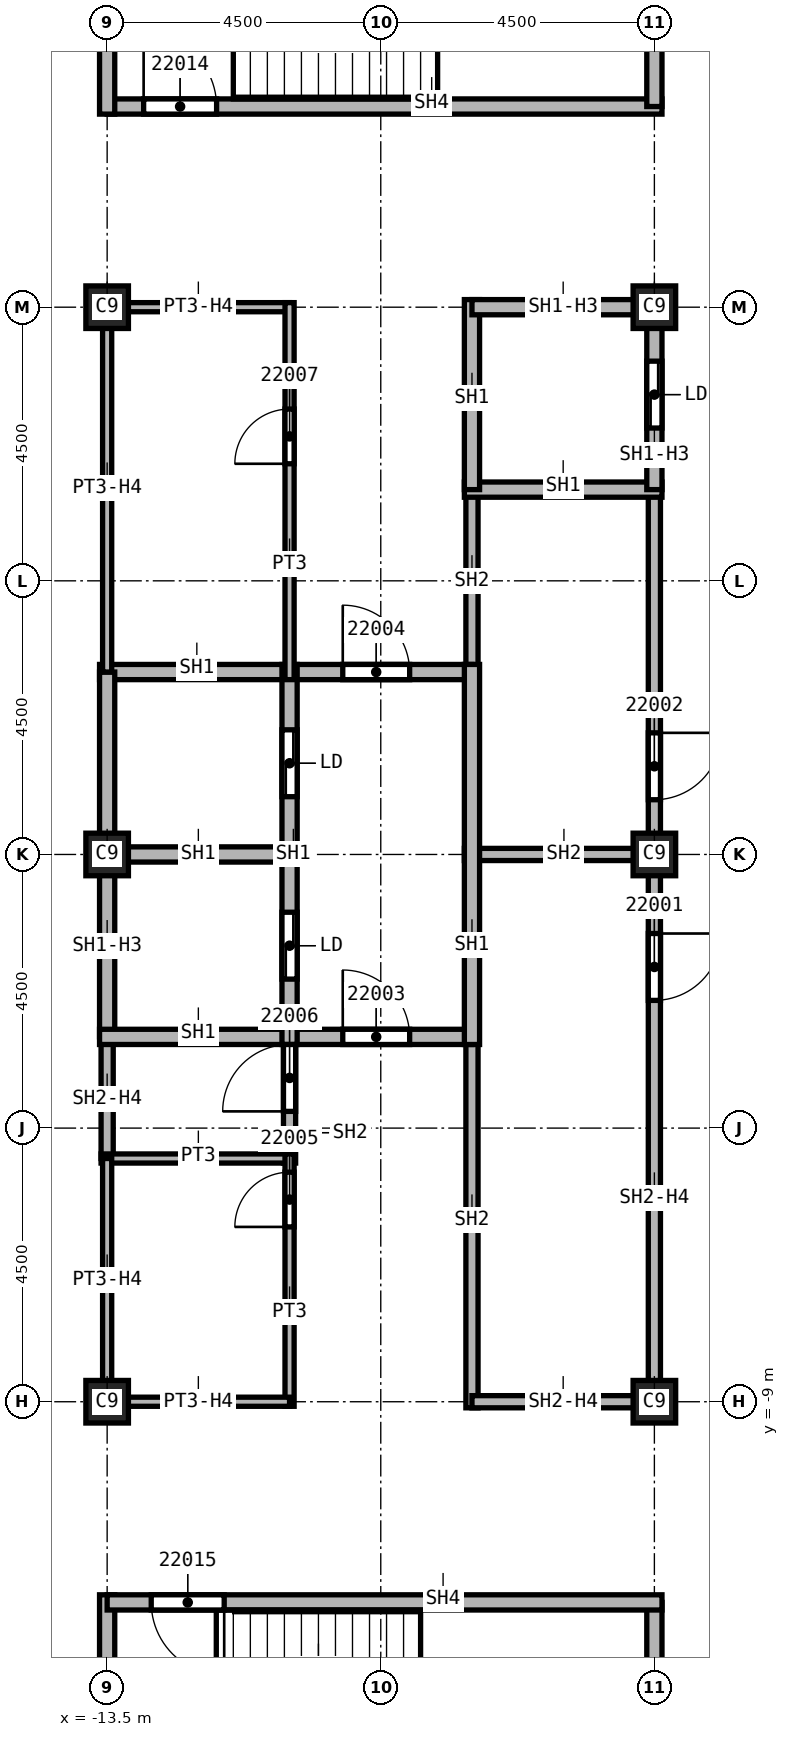
"""IFC4 building model, lengths in metres.
Left out: names, types, materials, properties, quantities, classifications, styles, units other than length and angle.
Written with IfcOpenShell. Run it as: python <this file> out.ifc"""

import sys

from ifc_helpers import new_model, si_unit, direction, frame, frame_2d, origin, origin_2d, place, context, subcontext, project, spatial, rectangle, extrude, element, fill, save


model = new_model("IFC4")
c1 = context("Model", 3, precision=1e-05, world=origin(), true_north=direction((0.0, 1.0)))
c2 = subcontext(c1, "Body", "Model", "MODEL_VIEW")
j1 = project(units=[si_unit("LENGTHUNIT", "METRE"), si_unit("PLANEANGLEUNIT", "RADIAN")], contexts=[c1])
p1 = place(None, origin())
s1 = spatial("IfcSite", under=j1, at=p1, CompositionType="ELEMENT")
p2 = place(p1, origin())
s2 = spatial("IfcBuilding", under=s1, at=p2, CompositionType="ELEMENT")
p3 = place(p2, frame((0.0, 0.0, 312.0)))
s3 = spatial("IfcBuildingStorey", under=s2, at=p3, CompositionType="ELEMENT", Elevation=312.0)
for number, where, z_axis, x_axis in (
    (1, (-4.5, 0.0, 0.0), (0.0, 0.0, 1.0), (1.0, 0.0, 0.0)),
    (2, (-4.5, 9.0, 0.0), (0.0, 0.0, 1.0), (1.0, 0.0, 0.0)),
    (3, (-4.5, -9.0, 0.0), (0.0, 0.0, 1.0), (1.0, 0.0, 0.0)),
    (4, (-13.5, 0.0, 0.0), (0.0, 0.0, 1.0), (1.0, 0.0, 0.0)),
    (5, (-13.5, 9.0, 0.0), (0.0, 0.0, 1.0), (1.0, 0.0, 0.0)),
    (6, (-13.5, -9.0, 0.0), (0.0, 0.0, 1.0), (1.0, 0.0, 0.0)),
):
    element("IfcColumn", number, at=place(p3, frame(where, z_axis=z_axis, x_axis=x_axis)), inside=s3, PredefinedType="COLUMN", context=c2, shape_type="SweptSolid", body=[
        extrude(rectangle(XDim=0.7, YDim=0.7, at=origin_2d()), origin(), (0.0, 0.0, 1.0), 3.74),
    ])
p4 = place(p3, frame((-13.5, -5.0, 0.0), z_axis=(0.0, 0.0, 1.0), x_axis=(0.0, 1.0, 0.0)))
e7 = element("IfcWall", 7, at=p4, inside=s3, PredefinedType="SOLIDWALL", context=c2, shape_type="SweptSolid", body=[
    extrude(rectangle(XDim=2.0, YDim=0.2, at=frame_2d((1.0, 0.0))), origin(), (0.0, 0.0, 1.0), 3.062),
])
p5 = place(p3, frame((-10.5, -5.075, 0.0), z_axis=(0.0, 0.0, 1.0), x_axis=(0.0, 1.0, 0.0)))
e8 = element("IfcWall", 8, at=p5, inside=s3, PredefinedType="SOLIDWALL", context=c2, shape_type="SweptSolid", body=[
    extrude(rectangle(XDim=2.2, YDim=0.2, at=frame_2d((1.1, 0.0))), origin(), (0.0, 0.0, 1.0), 3.74),
])
p6 = place(p5, frame((0.85, 0.0, 0.0)))
e9 = element("IfcOpeningElement", 9, at=p6, cuts=e8, PredefinedType="OPENING", context=c2, shape_type="SweptSolid", body=[
    extrude(rectangle(XDim=1.1, YDim=2.1, at=frame_2d((0.55, 1.05))), frame((0.0, 0.1, 0.0), z_axis=(0.0, -1.0, 0.0), x_axis=(1.0, 0.0, 0.0)), (0.0, 0.0, 1.0), 0.2),
])
p7 = place(p3, frame((-7.625, 0.0, 0.0), z_axis=(0.0, 0.0, 1.0), x_axis=(1.0, 0.0, 0.0)))
e10 = element("IfcWall", 10, at=p7, inside=s3, PredefinedType="SOLIDWALL", context=c2, shape_type="SweptSolid", body=[
    extrude(rectangle(XDim=3.225, YDim=0.2, at=frame_2d((1.613, 0.0))), origin(), (0.0, 0.0, 1.0), 3.74),
])
p8 = place(p3, frame((-7.5, -9.1, 0.0), z_axis=(0.0, 0.0, 1.0), x_axis=(0.0, 1.0, 0.0)))
e11 = element("IfcWall", 11, at=p8, inside=s3, PredefinedType="SOLIDWALL", context=c2, shape_type="SweptSolid", body=[
    extrude(rectangle(XDim=6.225, YDim=0.2, at=frame_2d((3.113, 0.0))), origin(), (0.0, 0.0, 1.0), 3.74),
])
p9 = place(p3, frame((-7.5, 2.875, 0.0), z_axis=(0.0, 0.0, 1.0), x_axis=(0.0, 1.0, 0.0)))
e12 = element("IfcWall", 12, at=p9, inside=s3, PredefinedType="SOLIDWALL", context=c2, shape_type="SweptSolid", body=[
    extrude(rectangle(XDim=3.125, YDim=0.2, at=frame_2d((1.562, 0.0))), origin(), (0.0, 0.0, 1.0), 3.74),
])
p10 = place(p3, frame((-4.5, -9.0, 0.0), z_axis=(0.0, 0.0, 1.0), x_axis=(-1.0, 0.0, 0.0)))
e13 = element("IfcWall", 13, at=p10, inside=s3, PredefinedType="SOLIDWALL", context=c2, shape_type="SweptSolid", body=[
    extrude(rectangle(XDim=3.0, YDim=0.2, at=frame_2d((1.5, 0.0))), origin(), (0.0, 0.0, 1.0), 3.062),
])
p11 = place(p3, frame((-4.5, 6.0, 0.0), z_axis=(0.0, 0.0, 1.0), x_axis=(0.0, -1.0, 0.0)))
e14 = element("IfcWall", 14, at=p11, inside=s3, PredefinedType="SOLIDWALL", context=c2, shape_type="SweptSolid", body=[
    extrude(rectangle(XDim=15.1, YDim=0.2, at=frame_2d((7.55, 0.0))), origin(), (0.0, 0.0, 1.0), 3.062),
])
p12 = place(p11, frame((7.3, 0.0, 0.0)))
e15 = element("IfcOpeningElement", 15, at=p12, cuts=e14, PredefinedType="OPENING", context=c2, shape_type="SweptSolid", body=[
    extrude(rectangle(XDim=1.1, YDim=2.1, at=frame_2d((0.55, 1.05))), frame((0.0, 0.1, 0.0), z_axis=(0.0, -1.0, 0.0), x_axis=(1.0, 0.0, 0.0)), (0.0, 0.0, 1.0), 0.2),
])
p13 = place(p11, frame((4.0, 0.0, 0.0)))
e16 = element("IfcOpeningElement", 16, at=p13, cuts=e14, PredefinedType="OPENING", context=c2, shape_type="SweptSolid", body=[
    extrude(rectangle(XDim=1.1, YDim=2.1, at=frame_2d((0.55, 1.05))), frame((0.0, 0.1, 0.0), z_axis=(0.0, -1.0, 0.0), x_axis=(1.0, 0.0, 0.0)), (0.0, 0.0, 1.0), 0.2),
])
p14 = place(p3, frame((-13.625, 0.0, 0.0), z_axis=(0.0, 0.0, 1.0), x_axis=(1.0, 0.0, 0.0)))
e17 = element("IfcWall", 17, at=p14, inside=s3, PredefinedType="SOLIDWALL", context=c2, shape_type="SweptSolid", body=[
    extrude(rectangle(XDim=3.125, YDim=0.25, at=frame_2d((1.562, 0.0))), origin(), (0.0, 0.0, 1.0), 3.74),
])
p15 = place(p3, frame((-13.625, 3.0, 0.0), z_axis=(0.0, 0.0, 1.0), x_axis=(1.0, 0.0, 0.0)))
e18 = element("IfcWall", 18, at=p15, inside=s3, PredefinedType="SOLIDWALL", context=c2, shape_type="SweptSolid", body=[
    extrude(rectangle(XDim=6.125, YDim=0.25, at=frame_2d((3.062, 0.0))), origin(), (0.0, 0.0, 1.0), 3.74),
])
p16 = place(p15, frame((4.0, 0.0, 0.0)))
e19 = element("IfcOpeningElement", 19, at=p16, cuts=e18, PredefinedType="OPENING", context=c2, shape_type="SweptSolid", body=[
    extrude(rectangle(XDim=1.1, YDim=2.1, at=frame_2d((0.55, 1.05))), frame((0.0, 0.125, 0.0), z_axis=(0.0, -1.0, 0.0), x_axis=(1.0, 0.0, 0.0)), (0.0, 0.0, 1.0), 0.25),
])
p17 = place(p3, frame((-13.5, -3.0, 0.0), z_axis=(0.0, 0.0, 1.0), x_axis=(0.0, 1.0, 0.0)))
e20 = element("IfcWall", 20, at=p17, inside=s3, PredefinedType="SOLIDWALL", context=c2, shape_type="SweptSolid", body=[
    extrude(rectangle(XDim=6.0, YDim=0.25, at=frame_2d((3.0, 0.0))), origin(), (0.0, 0.0, 1.0), 3.062),
])
p18 = place(p3, frame((-13.625, -3.0, 0.0), z_axis=(0.0, 0.0, 1.0), x_axis=(1.0, 0.0, 0.0)))
e21 = element("IfcWall", 21, at=p18, inside=s3, PredefinedType="SOLIDWALL", context=c2, shape_type="SweptSolid", body=[
    extrude(rectangle(XDim=6.125, YDim=0.25, at=frame_2d((3.062, 0.0))), origin(), (0.0, 0.0, 1.0), 3.74),
])
p19 = place(p18, frame((4.0, 0.0, 0.0)))
e22 = element("IfcOpeningElement", 22, at=p19, cuts=e21, PredefinedType="OPENING", context=c2, shape_type="SweptSolid", body=[
    extrude(rectangle(XDim=1.1, YDim=2.1, at=frame_2d((0.55, 1.05))), frame((0.0, 0.125, 0.0), z_axis=(0.0, -1.0, 0.0), x_axis=(1.0, 0.0, 0.0)), (0.0, 0.0, 1.0), 0.25),
])
p20 = place(p3, frame((-10.5, -3.125, 0.0), z_axis=(0.0, 0.0, 1.0), x_axis=(0.0, 1.0, 0.0)))
e23 = element("IfcWall", 23, at=p20, inside=s3, PredefinedType="SOLIDWALL", context=c2, shape_type="SweptSolid", body=[
    extrude(rectangle(XDim=6.25, YDim=0.25, at=frame_2d((3.125, 0.0))), origin(), (0.0, 0.0, 1.0), 3.74),
])
p21 = place(p20, frame((1.075, 0.0, 0.0)))
e24 = element("IfcOpeningElement", 24, at=p21, cuts=e23, PredefinedType="OPENING", context=c2, shape_type="SweptSolid", body=[
    extrude(rectangle(XDim=1.1, YDim=2.1, at=frame_2d((0.55, 1.05))), frame((0.0, 0.125, 0.0), z_axis=(0.0, -1.0, 0.0), x_axis=(1.0, 0.0, 0.0)), (0.0, 0.0, 1.0), 0.25),
])
p22 = place(p20, frame((4.075, 0.0, 0.0)))
e25 = element("IfcOpeningElement", 25, at=p22, cuts=e23, PredefinedType="OPENING", context=c2, shape_type="SweptSolid", body=[
    extrude(rectangle(XDim=1.1, YDim=2.1, at=frame_2d((0.55, 1.05))), frame((0.0, 0.125, 0.0), z_axis=(0.0, -1.0, 0.0), x_axis=(1.0, 0.0, 0.0)), (0.0, 0.0, 1.0), 0.25),
])
p23 = place(p3, frame((-7.625, 6.0, 0.0), z_axis=(0.0, 0.0, 1.0), x_axis=(1.0, 0.0, 0.0)))
e26 = element("IfcWall", 26, at=p23, inside=s3, PredefinedType="SOLIDWALL", context=c2, shape_type="SweptSolid", body=[
    extrude(rectangle(XDim=3.25, YDim=0.25, at=frame_2d((1.625, 0.0))), origin(), (0.0, 0.0, 1.0), 3.74),
])
p24 = place(p3, frame((-7.5, -3.125, 0.0), z_axis=(0.0, 0.0, 1.0), x_axis=(0.0, 1.0, 0.0)))
e27 = element("IfcWall", 27, at=p24, inside=s3, PredefinedType="SOLIDWALL", context=c2, shape_type="SweptSolid", body=[
    extrude(rectangle(XDim=6.25, YDim=0.25, at=frame_2d((3.125, 0.0))), origin(), (0.0, 0.0, 1.0), 3.74),
])
p25 = place(p3, frame((-7.5, 6.0, 0.0), z_axis=(0.0, 0.0, 1.0), x_axis=(0.0, 1.0, 0.0)))
e28 = element("IfcWall", 28, at=p25, inside=s3, PredefinedType="SOLIDWALL", context=c2, shape_type="SweptSolid", body=[
    extrude(rectangle(XDim=3.125, YDim=0.25, at=frame_2d((1.562, 0.0))), origin(), (0.0, 0.0, 1.0), 3.74),
])
p26 = place(p3, frame((-7.5, 9.0, 0.0), z_axis=(0.0, 0.0, 1.0), x_axis=(1.0, 0.0, 0.0)))
e29 = element("IfcWall", 29, at=p26, inside=s3, PredefinedType="SOLIDWALL", context=c2, shape_type="SweptSolid", body=[
    extrude(rectangle(XDim=3.0, YDim=0.25, at=frame_2d((1.5, 0.0))), origin(), (0.0, 0.0, 1.0), 3.062),
])
p27 = place(p3, frame((-4.5, 9.125, 0.0), z_axis=(0.0, 0.0, 1.0), x_axis=(0.0, -1.0, 0.0)))
e30 = element("IfcWall", 30, at=p27, inside=s3, PredefinedType="SOLIDWALL", context=c2, shape_type="SweptSolid", body=[
    extrude(rectangle(XDim=3.125, YDim=0.25, at=frame_2d((1.562, 0.0))), origin(), (0.0, 0.0, 1.0), 3.062),
])
p28 = place(p27, frame((1.012, 0.0, 0.0)))
e31 = element("IfcOpeningElement", 31, at=p28, cuts=e30, PredefinedType="OPENING", context=c2, shape_type="SweptSolid", body=[
    extrude(rectangle(XDim=1.1, YDim=2.1, at=frame_2d((0.55, 1.05))), frame((0.0, 0.125, 0.0), z_axis=(0.0, -1.0, 0.0), x_axis=(1.0, 0.0, 0.0)), (0.0, 0.0, 1.0), 0.25),
])
p29 = place(p3, frame((-13.5, -12.175, 0.0), z_axis=(0.0, 0.0, 1.0), x_axis=(0.0, -1.0, 0.0)))
e32 = element("IfcWall", 32, at=p29, inside=s3, PredefinedType="SOLIDWALL", context=c2, shape_type="SweptSolid", body=[
    extrude(rectangle(XDim=4.75, YDim=0.25, at=frame_2d((2.375, 0.0))), origin(), (0.0, 0.0, 1.0), 3.74),
])
p30 = place(p3, frame((-13.5, 12.3, 0.0), z_axis=(0.0, 0.0, 1.0), x_axis=(1.0, 0.0, 0.0)))
e33 = element("IfcWall", 33, at=p30, inside=s3, PredefinedType="SOLIDWALL", context=c2, shape_type="SweptSolid", body=[
    extrude(rectangle(XDim=9.125, YDim=0.25, at=frame_2d((4.562, 0.0))), origin(), (0.0, 0.0, 1.0), 3.74),
])
p31 = place(p30, frame((0.6, 0.0, 0.0)))
e34 = element("IfcOpeningElement", 34, at=p31, cuts=e33, PredefinedType="OPENING", context=c2, shape_type="SweptSolid", body=[
    extrude(rectangle(XDim=1.2, YDim=2.1, at=frame_2d((0.6, 1.05))), frame((0.0, 0.125, 0.0), z_axis=(0.0, -1.0, 0.0), x_axis=(1.0, 0.0, 0.0)), (0.0, 0.0, 1.0), 0.25),
])
p32 = place(p3, frame((-13.5, 12.175, 0.0), z_axis=(0.0, 0.0, 1.0), x_axis=(0.0, 1.0, 0.0)))
e35 = element("IfcWall", 35, at=p32, inside=s3, PredefinedType="SOLIDWALL", context=c2, shape_type="SweptSolid", body=[
    extrude(rectangle(XDim=4.75, YDim=0.25, at=frame_2d((2.375, 0.0))), origin(), (0.0, 0.0, 1.0), 3.74),
])
p33 = place(p3, frame((-4.5, -12.3, 0.0), z_axis=(0.0, 0.0, 1.0), x_axis=(0.0, -1.0, 0.0)))
e36 = element("IfcWall", 36, at=p33, inside=s3, PredefinedType="SOLIDWALL", context=c2, shape_type="SweptSolid", body=[
    extrude(rectangle(XDim=4.625, YDim=0.25, at=frame_2d((2.312, 0.0))), origin(), (0.0, 0.0, 1.0), 3.74),
])
p34 = place(p3, frame((-4.5, 16.8, 0.0), z_axis=(0.0, 0.0, 1.0), x_axis=(0.0, -1.0, 0.0)))
e37 = element("IfcWall", 37, at=p34, inside=s3, PredefinedType="SOLIDWALL", context=c2, shape_type="SweptSolid", body=[
    extrude(rectangle(XDim=4.5, YDim=0.25, at=frame_2d((2.25, 0.0))), origin(), (0.0, 0.0, 1.0), 3.74),
])
p35 = place(p3, frame((-4.375, -12.3, 0.0), z_axis=(0.0, 0.0, 1.0), x_axis=(-1.0, 0.0, 0.0)))
e38 = element("IfcWall", 38, at=p35, inside=s3, PredefinedType="SOLIDWALL", context=c2, shape_type="SweptSolid", body=[
    extrude(rectangle(XDim=9.125, YDim=0.25, at=frame_2d((4.562, 0.0))), origin(), (0.0, 0.0, 1.0), 3.74),
])
p36 = place(p35, frame((7.2, 0.0, 0.0)))
e39 = element("IfcOpeningElement", 39, at=p36, cuts=e38, PredefinedType="OPENING", context=c2, shape_type="SweptSolid", body=[
    extrude(rectangle(XDim=1.2, YDim=2.1, at=frame_2d((0.6, 1.05))), frame((0.0, 0.125, 0.0), z_axis=(0.0, -1.0, 0.0), x_axis=(1.0, 0.0, 0.0)), (0.0, 0.0, 1.0), 0.25),
])
p37 = place(p3, frame((-13.6, -5.0, 0.0), z_axis=(0.0, 0.0, 1.0), x_axis=(1.0, 0.0, 0.0)))
e40 = element("IfcWall", 40, at=p37, inside=s3, PredefinedType="PARTITIONING", context=c2, shape_type="SweptSolid", body=[
    extrude(rectangle(XDim=3.1, YDim=0.15, at=frame_2d((1.55, 0.0))), origin(), (0.0, 0.0, 1.0), 3.74),
])
p38 = place(p3, frame((-13.5, -9.075, 0.0), z_axis=(0.0, 0.0, 1.0), x_axis=(0.0, 1.0, 0.0)))
e41 = element("IfcWall", 41, at=p38, inside=s3, PredefinedType="PARTITIONING", context=c2, shape_type="SweptSolid", body=[
    extrude(rectangle(XDim=4.075, YDim=0.15, at=frame_2d((2.038, 0.0))), origin(), (0.0, 0.0, 1.0), 3.062),
])
p39 = place(p3, frame((-13.5, 3.0, 0.0), z_axis=(0.0, 0.0, 1.0), x_axis=(0.0, 1.0, 0.0)))
e42 = element("IfcWall", 42, at=p39, inside=s3, PredefinedType="PARTITIONING", context=c2, shape_type="SweptSolid", body=[
    extrude(rectangle(XDim=6.075, YDim=0.15, at=frame_2d((3.038, 0.0))), origin(), (0.0, 0.0, 1.0), 3.062),
])
p40 = place(p3, frame((-13.5, 9.0, 0.0), z_axis=(0.0, 0.0, 1.0), x_axis=(1.0, 0.0, 0.0)))
e43 = element("IfcWall", 43, at=p40, inside=s3, PredefinedType="PARTITIONING", context=c2, shape_type="SweptSolid", body=[
    extrude(rectangle(XDim=3.0, YDim=0.15, at=frame_2d((1.5, 0.0))), origin(), (0.0, 0.0, 1.0), 3.062),
])
p41 = place(p3, frame((-10.5, -9.075, 0.0), z_axis=(0.0, 0.0, 1.0), x_axis=(0.0, 1.0, 0.0)))
e44 = element("IfcWall", 44, at=p41, inside=s3, PredefinedType="PARTITIONING", context=c2, shape_type="SweptSolid", body=[
    extrude(rectangle(XDim=4.15, YDim=0.15, at=frame_2d((2.075, 0.0))), origin(), (0.0, 0.0, 1.0), 3.74),
])
p42 = place(p41, frame((2.95, 0.0, 0.0)))
e45 = element("IfcOpeningElement", 45, at=p42, cuts=e44, PredefinedType="OPENING", context=c2, shape_type="SweptSolid", body=[
    extrude(rectangle(XDim=0.9, YDim=2.1, at=frame_2d((0.45, 1.05))), frame((0.0, 0.075, 0.0), z_axis=(0.0, -1.0, 0.0), x_axis=(1.0, 0.0, 0.0)), (0.0, 0.0, 1.0), 0.15),
])
p43 = place(p3, frame((-10.5, -9.0, 0.0), z_axis=(0.0, 0.0, 1.0), x_axis=(-1.0, 0.0, 0.0)))
e46 = element("IfcWall", 46, at=p43, inside=s3, PredefinedType="PARTITIONING", context=c2, shape_type="SweptSolid", body=[
    extrude(rectangle(XDim=3.0, YDim=0.15, at=frame_2d((1.5, 0.0))), origin(), (0.0, 0.0, 1.0), 3.062),
])
p44 = place(p3, frame((-10.5, 2.875, 0.0), z_axis=(0.0, 0.0, 1.0), x_axis=(0.0, 1.0, 0.0)))
e47 = element("IfcWall", 47, at=p44, inside=s3, PredefinedType="PARTITIONING", context=c2, shape_type="SweptSolid", body=[
    extrude(rectangle(XDim=6.2, YDim=0.15, at=frame_2d((3.1, 0.0))), origin(), (0.0, 0.0, 1.0), 3.74),
])
p45 = place(p44, frame((3.55, 0.0, 0.0)))
e48 = element("IfcOpeningElement", 48, at=p45, cuts=e47, PredefinedType="OPENING", context=c2, shape_type="SweptSolid", body=[
    extrude(rectangle(XDim=0.9, YDim=2.1, at=frame_2d((0.45, 1.05))), frame((0.0, 0.075, 0.0), z_axis=(0.0, -1.0, 0.0), x_axis=(1.0, 0.0, 0.0)), (0.0, 0.0, 1.0), 0.15),
])
p46 = place(p12, origin())
e49 = element("IfcDoor", 49, at=p46, inside=s3, OperationType="SINGLE_SWING_RIGHT", PredefinedType="DOOR", context=c2, shape_type="SweptSolid", body=[
    extrude(rectangle(XDim=1.1, YDim=2.1, at=frame_2d((0.55, 1.05))), frame((0.0, 0.025, 0.0), z_axis=(0.0, -1.0, 0.0), x_axis=(1.0, 0.0, 0.0)), (0.0, 0.0, 1.0), 0.05),
])
fill(e15, e49)
p47 = place(p13, origin())
e50 = element("IfcDoor", 50, at=p47, inside=s3, OperationType="SINGLE_SWING_LEFT", PredefinedType="DOOR", context=c2, shape_type="SweptSolid", body=[
    extrude(rectangle(XDim=1.1, YDim=2.1, at=frame_2d((0.55, 1.05))), frame((0.0, 0.025, 0.0), z_axis=(0.0, -1.0, 0.0), x_axis=(1.0, 0.0, 0.0)), (0.0, 0.0, 1.0), 0.05),
])
fill(e16, e50)
p48 = place(p19, origin())
e51 = element("IfcDoor", 51, at=p48, inside=s3, OperationType="SINGLE_SWING_RIGHT", PredefinedType="DOOR", context=c2, shape_type="SweptSolid", body=[
    extrude(rectangle(XDim=1.1, YDim=2.1, at=frame_2d((0.55, 1.05))), frame((0.0, 0.025, 0.0), z_axis=(0.0, -1.0, 0.0), x_axis=(1.0, 0.0, 0.0)), (0.0, 0.0, 1.0), 0.05),
])
fill(e22, e51)
p49 = place(p16, origin())
e52 = element("IfcDoor", 52, at=p49, inside=s3, OperationType="SINGLE_SWING_LEFT", PredefinedType="DOOR", context=c2, shape_type="SweptSolid", body=[
    extrude(rectangle(XDim=1.1, YDim=2.1, at=frame_2d((0.55, 1.05))), frame((0.0, 0.025, 0.0), z_axis=(0.0, -1.0, 0.0), x_axis=(1.0, 0.0, 0.0)), (0.0, 0.0, 1.0), 0.05),
])
fill(e19, e52)
p50 = place(p42, origin())
e53 = element("IfcDoor", 53, at=p50, inside=s3, OperationType="SINGLE_SWING_RIGHT", PredefinedType="DOOR", context=c2, shape_type="SweptSolid", body=[
    extrude(rectangle(XDim=0.9, YDim=2.1, at=frame_2d((0.45, 1.05))), frame((0.0, 0.025, 0.0), z_axis=(0.0, -1.0, 0.0), x_axis=(1.0, 0.0, 0.0)), (0.0, 0.0, 1.0), 0.05),
])
fill(e45, e53)
p51 = place(p6, origin())
e54 = element("IfcDoor", 54, at=p51, inside=s3, OperationType="SINGLE_SWING_LEFT", PredefinedType="DOOR", context=c2, shape_type="SweptSolid", body=[
    extrude(rectangle(XDim=1.1, YDim=2.1, at=frame_2d((0.55, 1.05))), frame((0.0, 0.025, 0.0), z_axis=(0.0, -1.0, 0.0), x_axis=(1.0, 0.0, 0.0)), (0.0, 0.0, 1.0), 0.05),
])
fill(e9, e54)
p52 = place(p45, origin())
e55 = element("IfcDoor", 55, at=p52, inside=s3, OperationType="SINGLE_SWING_RIGHT", PredefinedType="DOOR", context=c2, shape_type="SweptSolid", body=[
    extrude(rectangle(XDim=0.9, YDim=2.1, at=frame_2d((0.45, 1.05))), frame((0.0, 0.025, 0.0), z_axis=(0.0, -1.0, 0.0), x_axis=(1.0, 0.0, 0.0)), (0.0, 0.0, 1.0), 0.05),
])
fill(e48, e55)
p53 = place(p31, origin())
e56 = element("IfcDoor", 56, at=p53, inside=s3, OperationType="SINGLE_SWING_LEFT", PredefinedType="DOOR", context=c2, shape_type="SweptSolid", body=[
    extrude(rectangle(XDim=1.2, YDim=2.1, at=frame_2d((0.6, 1.05))), frame((0.0, 0.025, 0.0), z_axis=(0.0, -1.0, 0.0), x_axis=(1.0, 0.0, 0.0)), (0.0, 0.0, 1.0), 0.05),
])
fill(e34, e56)
p54 = place(p36, origin())
e57 = element("IfcDoor", 57, at=p54, inside=s3, OperationType="SINGLE_SWING_RIGHT", PredefinedType="DOOR", context=c2, shape_type="SweptSolid", body=[
    extrude(rectangle(XDim=1.2, YDim=2.1, at=frame_2d((0.6, 1.05))), frame((0.0, 0.025, 0.0), z_axis=(0.0, -1.0, 0.0), x_axis=(1.0, 0.0, 0.0)), (0.0, 0.0, 1.0), 0.05),
])
fill(e39, e57)
p55 = place(p28, origin())
e58 = element("IfcDoor", 58, at=p55, inside=s3, OperationType="SLIDING_TO_LEFT", PredefinedType="DOOR", context=c2, shape_type="SweptSolid", body=[
    extrude(rectangle(XDim=1.1, YDim=2.1, at=frame_2d((0.55, 1.05))), frame((0.0, 0.025, 0.0), z_axis=(0.0, -1.0, 0.0), x_axis=(1.0, 0.0, 0.0)), (0.0, 0.0, 1.0), 0.05),
])
fill(e31, e58)
p56 = place(p21, origin())
e59 = element("IfcDoor", 59, at=p56, inside=s3, OperationType="SLIDING_TO_LEFT", PredefinedType="DOOR", context=c2, shape_type="SweptSolid", body=[
    extrude(rectangle(XDim=1.1, YDim=2.1, at=frame_2d((0.55, 1.05))), frame((0.0, 0.025, 0.0), z_axis=(0.0, -1.0, 0.0), x_axis=(1.0, 0.0, 0.0)), (0.0, 0.0, 1.0), 0.05),
])
fill(e24, e59)
p57 = place(p22, origin())
e60 = element("IfcDoor", 60, at=p57, inside=s3, OperationType="SLIDING_TO_LEFT", PredefinedType="DOOR", context=c2, shape_type="SweptSolid", body=[
    extrude(rectangle(XDim=1.1, YDim=2.1, at=frame_2d((0.55, 1.05))), frame((0.0, 0.025, 0.0), z_axis=(0.0, -1.0, 0.0), x_axis=(1.0, 0.0, 0.0)), (0.0, 0.0, 1.0), 0.05),
])
fill(e25, e60)
save(model, sys.argv[1])
